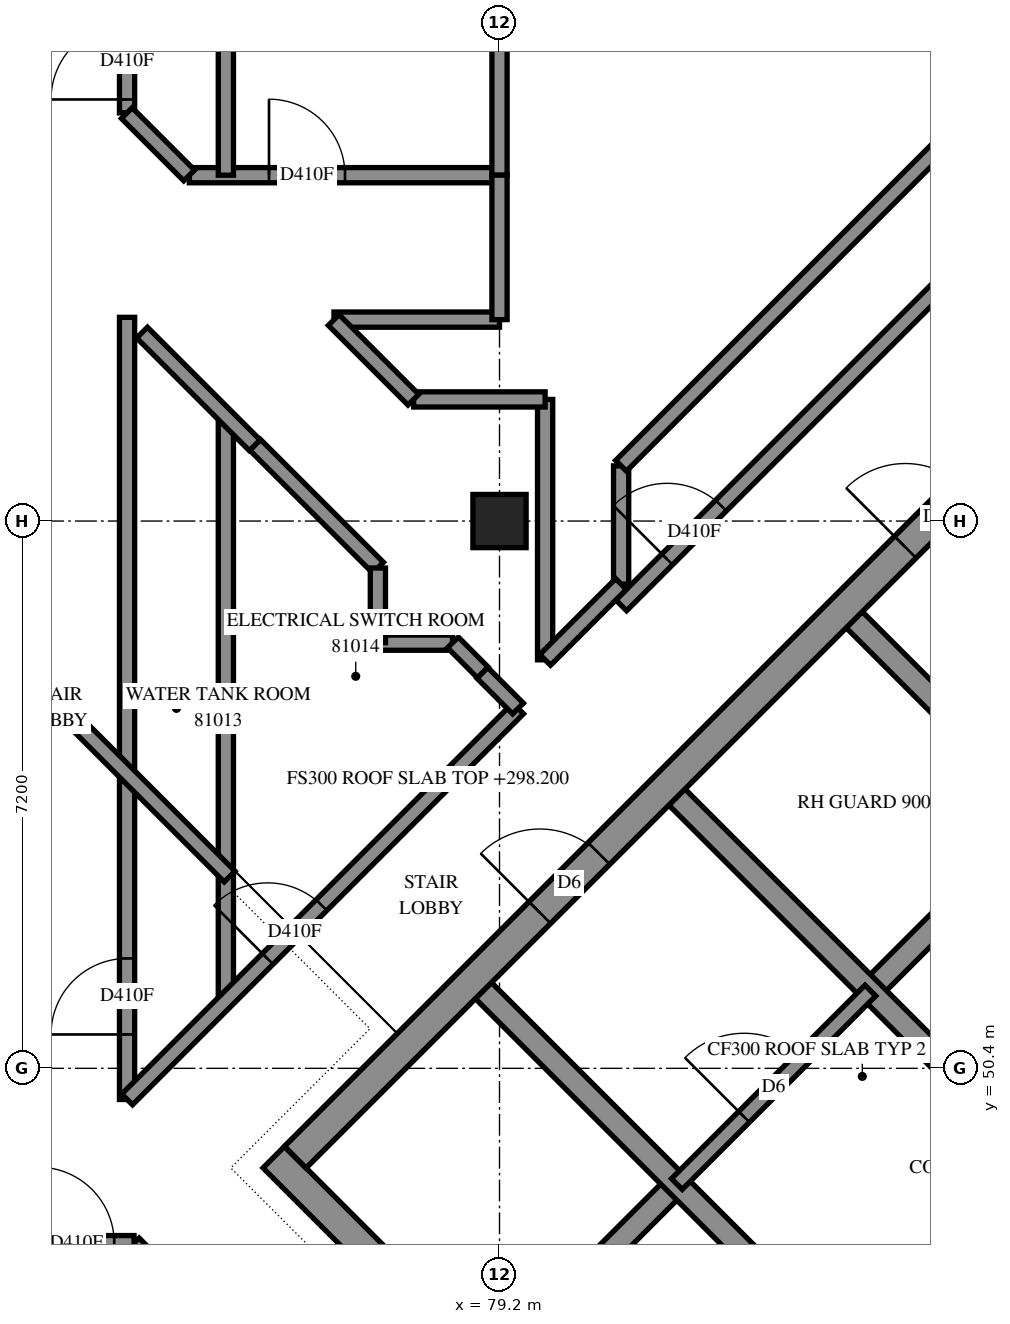
"""IFC4 building model, lengths in metres.
Left out: names, types, materials, properties, quantities, classifications, styles, units other than length and angle.
Written with IfcOpenShell. Run it as: python <this file> out.ifc"""

import sys

from ifc_helpers import new_model, si_unit, direction, frame, frame_2d, origin, origin_2d, place, context, subcontext, project, spatial, polyline, rectangle, outline, extrude, element, fill, save


model = new_model("IFC4")
c1 = context("Model", 3, precision=1e-05, world=origin(), true_north=direction((0.0, 1.0)))
c2 = subcontext(c1, "Body", "Model", "MODEL_VIEW")
j1 = project(units=[si_unit("LENGTHUNIT", "METRE"), si_unit("PLANEANGLEUNIT", "RADIAN")], contexts=[c1])
p1 = place(None, origin())
s1 = spatial("IfcSite", under=j1, at=p1, CompositionType="ELEMENT")
p2 = place(p1, origin())
s2 = spatial("IfcBuilding", under=s1, at=p2, CompositionType="ELEMENT")
p3 = place(p2, frame((0.0, 0.0, 298.2)))
s3 = spatial("IfcBuildingStorey", under=s2, at=p3, CompositionType="ELEMENT", Elevation=298.2)
p4 = place(p3, frame((79.2, 57.6, 0.0), z_axis=(0.0, 0.0, 1.0), x_axis=(1.0, 0.0, 0.0)))
e1 = element("IfcColumn", 1, at=p4, inside=s3, PredefinedType="COLUMN", context=c2, shape_type="SweptSolid", body=[
    extrude(rectangle(XDim=0.7, YDim=0.7, at=origin_2d()), origin(), (0.0, 0.0, 1.0), 3.5),
])
p5 = place(p3, frame((76.23, 49.231, -0.3), z_axis=(0.0, 0.0, 1.0), x_axis=(0.7071006083, -0.707112954, 0.0)))
e2 = element("IfcWall", 2, at=p5, inside=s3, PredefinedType="SHEAR", context=c2, shape_type="SweptSolid", body=[
    extrude(outline(polyline([(0.0, 0.0), (8.1, 0.0), (8.1, 3.1), (0.0, 3.1), (0.0, 0.0)])), frame((0.0, 0.2, 0.0), z_axis=(0.0, -1.0, 0.0), x_axis=(1.0, 0.0, 0.0)), (0.0, 0.0, 1.0), 0.4),
])
p6 = place(p3, frame((76.513, 49.231, -0.3), z_axis=(0.0, 0.0, 1.0), x_axis=(0.7071067812, 0.7071067812, 0.0)))
e3 = element("IfcWall", 3, at=p6, inside=s3, PredefinedType="SHEAR", context=c2, shape_type="SweptSolid", body=[
    extrude(outline(polyline([(0.0, 0.0), (14.4, 0.0), (14.4, 3.1), (0.0, 3.1), (0.0, 0.0)])), frame((0.0, 0.2, 0.0), z_axis=(0.0, -1.0, 0.0), x_axis=(1.0, 0.0, 0.0)), (0.0, 0.0, 1.0), 0.4),
])
p7 = place(p6, frame((4.55, 0.0, 0.3)))
e4 = element("IfcOpeningElement", 4, at=p7, cuts=e3, PredefinedType="OPENING", context=c2, shape_type="SweptSolid", body=[
    extrude(rectangle(XDim=1.1, YDim=2.1, at=frame_2d((0.55, 1.05))), frame((0.0, 0.21, 0.0), z_axis=(0.0, -1.0, 0.0), x_axis=(1.0, 0.0, 0.0)), (0.0, 0.0, 1.0), 0.42),
])
p8 = place(p6, frame((11.35, 0.0, 0.3)))
e5 = element("IfcOpeningElement", 5, at=p8, cuts=e3, PredefinedType="OPENING", context=c2, shape_type="SweptSolid", body=[
    extrude(rectangle(XDim=1.1, YDim=2.1, at=frame_2d((0.55, 1.05))), frame((0.0, 0.21, 0.0), z_axis=(0.0, -1.0, 0.0), x_axis=(1.0, 0.0, 0.0)), (0.0, 0.0, 1.0), 0.42),
])
for number, where, z_axis, x_axis in (
    (6, (79.2, 46.544, 0.0), (0.0, 0.0, 1.0), (0.707, 0.707, 0.0)),
    (7, (84.079, 51.423, 0.0), (0.0, 0.0, 1.0), (0.707, 0.707, 0.0)),
):
    element("IfcWall", number, at=place(p3, frame(where, z_axis=z_axis, x_axis=x_axis)), inside=s3, PredefinedType="SOLIDWALL", context=c2, shape_type="SweptSolid", body=[
        extrude(outline(polyline([(0.0, 0.0), (3.3, 0.0), (3.3, 3.5), (0.0, 3.5), (0.0, 0.0)])), frame((0.0, 0.15, 0.0), z_axis=(0.0, -1.0, 0.0), x_axis=(1.0, 0.0, 0.0)), (0.0, 0.0, 1.0), 0.3),
    ])
p9 = place(p3, frame((78.988, 51.423, 0.0), z_axis=(0.0, 0.0, 1.0), x_axis=(0.7071067812, -0.7071067812, 0.0)))
e8 = element("IfcWall", 8, at=p9, inside=s3, PredefinedType="SOLIDWALL", context=c2, shape_type="SweptSolid", body=[
    extrude(outline(polyline([(0.0, 0.0), (14.4, 0.0), (14.4, 3.5), (0.0, 3.5), (0.0, 0.0)])), frame((0.0, 0.15, 0.0), z_axis=(0.0, -1.0, 0.0), x_axis=(1.0, 0.0, 0.0)), (0.0, 0.0, 1.0), 0.3),
])
p10 = place(p3, frame((81.534, 53.969, 0.0), z_axis=(0.0, 0.0, 1.0), x_axis=(0.707103309, -0.7071102534, 0.0)))
e9 = element("IfcWall", 9, at=p10, inside=s3, PredefinedType="SOLIDWALL", context=c2, shape_type="SweptSolid", body=[
    extrude(outline(polyline([(0.0, 0.0), (14.4, 0.0), (14.4, 3.5), (0.0, 3.5), (0.0, 0.0)])), frame((0.0, 0.15, 0.0), z_axis=(0.0, -1.0, 0.0), x_axis=(1.0, 0.0, 0.0)), (0.0, 0.0, 1.0), 0.3),
])
p11 = place(p10, frame((12.05, 0.0, 0.0)))
e10 = element("IfcOpeningElement", 10, at=p11, cuts=e9, PredefinedType="OPENING", context=c2, shape_type="SweptSolid", body=[
    extrude(rectangle(XDim=1.1, YDim=2.1, at=frame_2d((0.55, 1.05))), frame((0.0, 0.16, 0.0), z_axis=(0.0, -1.0, 0.0), x_axis=(1.0, 0.0, 0.0)), (0.0, 0.0, 1.0), 0.32),
])
p12 = place(p3, frame((83.867, 56.302, 0.0), z_axis=(0.0, 0.0, 1.0), x_axis=(0.7071137256, -0.7070998367, 0.0)))
e11 = element("IfcWall", 11, at=p12, inside=s3, PredefinedType="SOLIDWALL", context=c2, shape_type="SweptSolid", body=[
    extrude(outline(polyline([(0.0, 0.0), (7.2, 0.0), (7.2, 3.5), (0.0, 3.5), (0.0, 0.0)])), frame((0.0, 0.15, 0.0), z_axis=(0.0, -1.0, 0.0), x_axis=(1.0, 0.0, 0.0)), (0.0, 0.0, 1.0), 0.3),
])
p13 = place(p3, frame((70.585, 48.654, 0.0), z_axis=(0.0, 0.0, 1.0), x_axis=(0.707112816, -0.7071007463, 0.0)))
e12 = element("IfcWall", 12, at=p13, inside=s3, PredefinedType="SOLIDWALL", context=c2, shape_type="SweptSolid", body=[
    extrude(outline(polyline([(0.0, -0.2), (8.256, -0.2), (8.314, 0.2), (0.0, 0.2), (0.0, -0.2)])), origin(), (0.0, 0.0, 1.0), 3.5),
])
p14 = place(p13, frame((1.284, 0.0, 0.7)))
e13 = element("IfcOpeningElement", 13, at=p14, cuts=e12, PredefinedType="OPENING", context=c2, shape_type="SweptSolid", body=[
    extrude(rectangle(XDim=1.8, YDim=2.2, at=frame_2d((0.9, 1.1))), frame((0.0, 0.21, 0.0), z_axis=(0.0, -1.0, 0.0), x_axis=(1.0, 0.0, 0.0)), (0.0, 0.0, 1.0), 0.42),
])
p15 = place(p13, frame((4.884, 0.0, 0.7)))
e14 = element("IfcOpeningElement", 14, at=p15, cuts=e12, PredefinedType="OPENING", context=c2, shape_type="SweptSolid", body=[
    extrude(rectangle(XDim=1.8, YDim=2.2, at=frame_2d((0.9, 1.1))), frame((0.0, 0.21, 0.0), z_axis=(0.0, -1.0, 0.0), x_axis=(1.0, 0.0, 0.0)), (0.0, 0.0, 1.0), 0.42),
])
p16 = place(p3, frame((81.534, 48.878, 0.0), z_axis=(0.0, 0.0, 1.0), x_axis=(0.707092892, 0.7071206701, 0.0)))
e15 = element("IfcWall", 15, at=p16, inside=s3, PredefinedType="PARTITIONING", context=c2, shape_type="SweptSolid", body=[
    extrude(outline(polyline([(0.0, 0.0), (3.6, 0.0), (3.6, 3.5), (0.0, 3.5), (0.0, 0.0)])), frame((0.0, 0.1, 0.0), z_axis=(0.0, -1.0, 0.0), x_axis=(1.0, 0.0, 0.0)), (0.0, 0.0, 1.0), 0.2),
])
p17 = place(p16, frame((1.25, 0.0, 0.0)))
e16 = element("IfcOpeningElement", 16, at=p17, cuts=e15, PredefinedType="OPENING", context=c2, shape_type="SweptSolid", body=[
    extrude(rectangle(XDim=1.1, YDim=2.1, at=frame_2d((0.55, 1.05))), frame((0.0, 0.11, 0.0), z_axis=(0.0, -1.0, 0.0), x_axis=(1.0, 0.0, 0.0)), (0.0, 0.0, 1.0), 0.22),
])
p18 = place(p3, frame((74.3, 49.99, 0.0), z_axis=(0.0, 0.0, 1.0), x_axis=(0.0, 1.0, 0.0)))
e17 = element("IfcWall", 17, at=p18, inside=s3, PredefinedType="PARTITIONING", context=c2, shape_type="SweptSolid", body=[
    extrude(rectangle(XDim=10.29, YDim=0.2, at=frame_2d((5.145, 0.0))), origin(), (0.0, 0.0, 1.0), 3.5),
])
p19 = place(p18, frame((0.856, 0.0, 0.0)))
e18 = element("IfcOpeningElement", 18, at=p19, cuts=e17, PredefinedType="OPENING", context=c2, shape_type="SweptSolid", body=[
    extrude(rectangle(XDim=1.0, YDim=2.1, at=frame_2d((0.5, 1.05))), frame((0.0, 0.11, 0.0), z_axis=(0.0, -1.0, 0.0), x_axis=(1.0, 0.0, 0.0)), (0.0, 0.0, 1.0), 0.22),
])
p20 = place(p3, frame((74.388, 48.096, 0.0), z_axis=(0.0, 0.0, 1.0), x_axis=(0.7071067812, -0.7071067812, 0.0)))
e19 = element("IfcWall", 19, at=p20, inside=s3, PredefinedType="PARTITIONING", context=c2, shape_type="SweptSolid", body=[
    extrude(rectangle(XDim=8.9, YDim=0.2, at=frame_2d((4.45, 0.0))), origin(), (0.0, 0.0, 1.0), 3.5),
])
p21 = place(p20, frame((2.564, 0.0, 0.0)))
e20 = element("IfcOpeningElement", 20, at=p21, cuts=e19, PredefinedType="OPENING", context=c2, shape_type="SweptSolid", body=[
    extrude(rectangle(XDim=1.0, YDim=2.1, at=frame_2d((0.5, 1.05))), frame((0.0, 0.11, 0.0), z_axis=(0.0, -1.0, 0.0), x_axis=(1.0, 0.0, 0.0)), (0.0, 0.0, 1.0), 0.22),
])
p22 = place(p3, frame((80.801, 56.491, 0.0), z_axis=(0.0, 0.0, 1.0), x_axis=(0.7071067812, 0.7071067812, 0.0)))
e21 = element("IfcWall", 21, at=p22, inside=s3, PredefinedType="PARTITIONING", context=c2, shape_type="SweptSolid", body=[
    extrude(rectangle(XDim=8.533, YDim=0.2, at=frame_2d((4.267, 0.0))), origin(), (0.0, 0.0, 1.0), 3.5),
])
p23 = place(p22, frame((0.856, 0.0, 0.0)))
e22 = element("IfcOpeningElement", 22, at=p23, cuts=e21, PredefinedType="OPENING", context=c2, shape_type="SweptSolid", body=[
    extrude(rectangle(XDim=1.0, YDim=2.1, at=frame_2d((0.5, 1.05))), frame((0.0, 0.11, 0.0), z_axis=(0.0, -1.0, 0.0), x_axis=(1.0, 0.0, 0.0)), (0.0, 0.0, 1.0), 0.22),
])
p24 = place(p3, frame((75.6, 51.288, 0.0), z_axis=(0.0, 0.0, 1.0), x_axis=(0.0, 1.0, 0.0)))
e23 = element("IfcWall", 23, at=p24, inside=s3, PredefinedType="PARTITIONING", context=c2, shape_type="SweptSolid", body=[
    extrude(rectangle(XDim=7.694, YDim=0.2, at=frame_2d((3.847, 0.0))), origin(), (0.0, 0.0, 1.0), 3.5),
])
p25 = place(p3, frame((74.301, 49.991, 0.0), z_axis=(0.0, 0.0, 1.0), x_axis=(0.7071067812, 0.7071067812, 0.0)))
e24 = element("IfcWall", 24, at=p25, inside=s3, PredefinedType="PARTITIONING", context=c2, shape_type="SweptSolid", body=[
    extrude(rectangle(XDim=7.275, YDim=0.2, at=frame_2d((3.637, 0.0))), origin(), (0.0, 0.0, 1.0), 3.5),
])
p26 = place(p25, frame((2.615, 0.0, 0.0)))
e25 = element("IfcOpeningElement", 25, at=p26, cuts=e24, PredefinedType="OPENING", context=c2, shape_type="SweptSolid", body=[
    extrude(rectangle(XDim=1.0, YDim=2.1, at=frame_2d((0.5, 1.05))), frame((0.0, 0.11, 0.0), z_axis=(0.0, -1.0, 0.0), x_axis=(1.0, 0.0, 0.0)), (0.0, 0.0, 1.0), 0.22),
])
p27 = place(p3, frame((74.3, 62.97, 0.0), z_axis=(0.0, 0.0, 1.0), x_axis=(0.0, 1.0, 0.0)))
e26 = element("IfcWall", 26, at=p27, inside=s3, PredefinedType="PARTITIONING", context=c2, shape_type="SweptSolid", body=[
    extrude(rectangle(XDim=4.13, YDim=0.2, at=frame_2d((2.065, 0.0))), origin(), (0.0, 0.0, 1.0), 3.5),
])
p28 = place(p27, frame((0.176, 0.0, 0.0)))
e27 = element("IfcOpeningElement", 27, at=p28, cuts=e26, PredefinedType="OPENING", context=c2, shape_type="SweptSolid", body=[
    extrude(rectangle(XDim=1.0, YDim=2.1, at=frame_2d((0.5, 1.05))), frame((0.0, 0.11, 0.0), z_axis=(0.0, -1.0, 0.0), x_axis=(1.0, 0.0, 0.0)), (0.0, 0.0, 1.0), 0.22),
])
p29 = place(p3, frame((75.12, 62.15, 0.0), z_axis=(0.0, 0.0, 1.0), x_axis=(1.0, 0.0, 0.0)))
e28 = element("IfcWall", 28, at=p29, inside=s3, PredefinedType="PARTITIONING", context=c2, shape_type="SweptSolid", body=[
    extrude(rectangle(XDim=4.08, YDim=0.2, at=frame_2d((2.04, 0.0))), origin(), (0.0, 0.0, 1.0), 3.5),
])
p30 = place(p29, frame((1.048, 0.0, 0.0)))
e29 = element("IfcOpeningElement", 29, at=p30, cuts=e28, PredefinedType="OPENING", context=c2, shape_type="SweptSolid", body=[
    extrude(rectangle(XDim=1.0, YDim=2.1, at=frame_2d((0.5, 1.05))), frame((0.0, 0.11, 0.0), z_axis=(0.0, -1.0, 0.0), x_axis=(1.0, 0.0, 0.0)), (0.0, 0.0, 1.0), 0.22),
])
p31 = place(p3, frame((79.8, 55.774, 0.0), z_axis=(0.0, 0.0, 1.0), x_axis=(0.0, 1.0, 0.0)))
e30 = element("IfcWall", 30, at=p31, inside=s3, PredefinedType="PARTITIONING", context=c2, shape_type="SweptSolid", body=[
    extrude(rectangle(XDim=3.426, YDim=0.2, at=frame_2d((1.713, 0.0))), origin(), (0.0, 0.0, 1.0), 3.5),
])
p32 = place(p3, frame((79.2, 62.15, 0.0), z_axis=(0.0, 0.0, 1.0), x_axis=(0.0, 1.0, 0.0)))
e31 = element("IfcWall", 31, at=p32, inside=s3, PredefinedType="PARTITIONING", context=c2, shape_type="SweptSolid", body=[
    extrude(rectangle(XDim=2.3, YDim=0.2, at=frame_2d((1.15, 0.0))), origin(), (0.0, 0.0, 1.0), 3.5),
])
p33 = place(p3, frame((75.985, 58.603, 0.0), z_axis=(0.0, 0.0, 1.0), x_axis=(0.7075439414, -0.7066693506, 0.0)))
e32 = element("IfcWall", 32, at=p33, inside=s3, PredefinedType="PARTITIONING", context=c2, shape_type="SweptSolid", body=[
    extrude(rectangle(XDim=2.287, YDim=0.2, at=frame_2d((1.143, 0.0))), origin(), (0.0, 0.0, 1.0), 3.5),
])
p34 = place(p3, frame((77.022, 60.25, 0.0), z_axis=(0.0, 0.0, 1.0), x_axis=(1.0, 0.0, 0.0)))
e33 = element("IfcWall", 33, at=p34, inside=s3, PredefinedType="PARTITIONING", context=c2, shape_type="SweptSolid", body=[
    extrude(rectangle(XDim=2.178, YDim=0.2, at=frame_2d((1.089, 0.0))), origin(), (0.0, 0.0, 1.0), 3.5),
])
p35 = place(p3, frame((74.497, 60.079, 0.0), z_axis=(0.0, 0.0, 1.0), x_axis=(0.7071067812, -0.7071067812, 0.0)))
e34 = element("IfcWall", 34, at=p35, inside=s3, PredefinedType="PARTITIONING", context=c2, shape_type="SweptSolid", body=[
    extrude(rectangle(XDim=2.096, YDim=0.2, at=frame_2d((1.048, 0.0))), origin(), (0.0, 0.0, 1.0), 3.5),
])
p36 = place(p3, frame((79.2, 60.25, 0.0), z_axis=(0.0, 0.0, 1.0), x_axis=(0.0, 1.0, 0.0)))
e35 = element("IfcWall", 35, at=p36, inside=s3, PredefinedType="PARTITIONING", context=c2, shape_type="SweptSolid", body=[
    extrude(rectangle(XDim=1.9, YDim=0.2, at=frame_2d((0.95, 0.0))), origin(), (0.0, 0.0, 1.0), 3.5),
])
p37 = place(p3, frame((78.07, 59.2, 0.0), z_axis=(0.0, 0.0, 1.0), x_axis=(1.0, 0.0, 0.0)))
e36 = element("IfcWall", 36, at=p37, inside=s3, PredefinedType="PARTITIONING", context=c2, shape_type="SweptSolid", body=[
    extrude(rectangle(XDim=1.73, YDim=0.2, at=frame_2d((0.865, 0.0))), origin(), (0.0, 0.0, 1.0), 3.5),
])
p38 = place(p3, frame((80.8, 56.77, 0.0), z_axis=(0.0, 0.0, 1.0), x_axis=(0.0, 1.0, 0.0)))
e37 = element("IfcWall", 37, at=p38, inside=s3, PredefinedType="PARTITIONING", context=c2, shape_type="SweptSolid", body=[
    extrude(rectangle(XDim=1.556, YDim=0.2, at=frame_2d((0.778, 0.0))), origin(), (0.0, 0.0, 1.0), 3.5),
])
p39 = place(p3, frame((77.019, 60.245, 0.0), z_axis=(0.0, 0.0, 1.0), x_axis=(0.7071067812, -0.7071067812, 0.0)))
e38 = element("IfcWall", 38, at=p39, inside=s3, PredefinedType="PARTITIONING", context=c2, shape_type="SweptSolid", body=[
    extrude(rectangle(XDim=1.482, YDim=0.2, at=frame_2d((0.741, 0.0))), origin(), (0.0, 0.0, 1.0), 3.5),
])
p40 = place(p3, frame((79.801, 55.773, 0.0), z_axis=(0.0, 0.0, 1.0), x_axis=(0.7071067812, 0.7071067812, 0.0)))
e39 = element("IfcWall", 39, at=p40, inside=s3, PredefinedType="PARTITIONING", context=c2, shape_type="SweptSolid", body=[
    extrude(rectangle(XDim=1.411, YDim=0.2, at=frame_2d((0.706, 0.0))), origin(), (0.0, 0.0, 1.0), 3.5),
])
p41 = place(p3, frame((74.297, 62.967, 0.0), z_axis=(0.0, 0.0, 1.0), x_axis=(0.7071067812, -0.7071067812, 0.0)))
e40 = element("IfcWall", 40, at=p41, inside=s3, PredefinedType="PARTITIONING", context=c2, shape_type="SweptSolid", body=[
    extrude(rectangle(XDim=1.16, YDim=0.2, at=frame_2d((0.58, 0.0))), origin(), (0.0, 0.0, 1.0), 3.5),
])
for number, where, z_axis, x_axis in (
    (41, (77.6, 56.0, 0.0), (0.0, 0.0, 1.0), (1.0, 0.0, 0.0)),
    (42, (77.6, 56.0, 0.0), (0.0, 0.0, 1.0), (0.0, 1.0, 0.0)),
):
    element("IfcWall", number, at=place(p3, frame(where, z_axis=z_axis, x_axis=x_axis)), inside=s3, PredefinedType="PARTITIONING", context=c2, shape_type="SweptSolid", body=[
        extrude(rectangle(XDim=0.982, YDim=0.2, at=frame_2d((0.491, 0.0))), origin(), (0.0, 0.0, 1.0), 3.5),
    ])
p42 = place(p3, frame((78.973, 55.603, 0.0), z_axis=(0.0, 0.0, 1.0), x_axis=(0.7071067812, -0.7071067812, 0.0)))
e43 = element("IfcWall", 43, at=p42, inside=s3, PredefinedType="PARTITIONING", context=c2, shape_type="SweptSolid", body=[
    extrude(rectangle(XDim=0.665, YDim=0.2, at=frame_2d((0.332, 0.0))), origin(), (0.0, 0.0, 1.0), 3.5),
])
p43 = place(p3, frame((78.587, 56.003, 0.0), z_axis=(0.0, 0.0, 1.0), x_axis=(0.705305244, -0.7089037401, 0.0)))
e44 = element("IfcWall", 44, at=p43, inside=s3, PredefinedType="PARTITIONING", context=c2, shape_type="SweptSolid", body=[
    extrude(rectangle(XDim=0.556, YDim=0.2, at=frame_2d((0.278, 0.0))), origin(), (0.0, 0.0, 1.0), 3.5),
])
p44 = place(p3, frame((75.65, 52.923, 0.0), z_axis=(0.0, 0.0, 1.0), x_axis=(-0.7071067812, 0.7071067812, 0.0)))
e45 = element("IfcWall", 45, at=p44, inside=s3, PredefinedType="PARAPET", context=c2, shape_type="SweptSolid", body=[
    extrude(outline(polyline([(0.0, -0.1), (3.294, -0.1), (3.294, 0.1), (0.0, 0.1), (0.0, -0.1)])), origin(), (0.0, 0.0, 1.0), 0.25),
])
p45 = place(p3, frame((75.6, 62.15, 0.0), z_axis=(0.0, 0.0, 1.0), x_axis=(0.0, 1.0, 0.0)))
e46 = element("IfcWall", 46, at=p45, inside=s3, PredefinedType="PARTITIONING", context=c2, shape_type="SweptSolid", body=[
    extrude(outline(polyline([(0.0, -0.1), (10.65, -0.1), (10.65, 0.1), (0.0, 0.1), (0.0, -0.1)])), origin(), (0.0, 0.0, 1.0), 3.5),
])
p46 = place(p3, frame((80.799, 58.327, 0.0), z_axis=(0.0, 0.0, 1.0), x_axis=(0.7071067812, 0.7071067812, 0.0)))
e47 = element("IfcWall", 47, at=p46, inside=s3, PredefinedType="PARTITIONING", context=c2, shape_type="SweptSolid", body=[
    extrude(outline(polyline([(0.0, -0.1), (9.338, -0.1), (9.338, 0.1), (0.0, 0.1), (0.0, -0.1)])), origin(), (0.0, 0.0, 1.0), 3.5),
])
p47 = place(p3, frame((71.422, 48.1, 0.0), z_axis=(0.0, 0.0, 1.0), x_axis=(1.0, 0.0, 0.0)))
e48 = element("IfcWall", 48, at=p47, inside=s3, PredefinedType="PARTITIONING", context=c2, shape_type="SweptSolid", body=[
    extrude(outline(polyline([(0.0, -0.1), (2.97, -0.1), (2.97, 0.1), (0.0, 0.1), (0.0, -0.1)])), origin(), (0.0, 0.0, 1.0), 3.5),
])
p48 = place(p47, frame((1.71, 0.0, 0.0)))
e49 = element("IfcOpeningElement", 49, at=p48, cuts=e48, PredefinedType="OPENING", context=c2, shape_type="SweptSolid", body=[
    extrude(rectangle(XDim=1.0, YDim=2.1, at=frame_2d((0.5, 1.05))), frame((0.0, 0.11, 0.0), z_axis=(0.0, -1.0, 0.0), x_axis=(1.0, 0.0, 0.0)), (0.0, 0.0, 1.0), 0.22),
])
p49 = place(p7, origin())
e50 = element("IfcDoor", 50, at=p49, inside=s3, OperationType="DOUBLE_DOOR_SINGLE_SWING", PredefinedType="DOOR", context=c2, shape_type="SweptSolid", body=[
    extrude(rectangle(XDim=1.1, YDim=2.1, at=frame_2d((0.55, 1.05))), frame((0.0, 0.025, 0.0), z_axis=(0.0, -1.0, 0.0), x_axis=(1.0, 0.0, 0.0)), (0.0, 0.0, 1.0), 0.05),
])
fill(e4, e50)
p50 = place(p8, origin())
e51 = element("IfcDoor", 51, at=p50, inside=s3, OperationType="SINGLE_SWING_LEFT", PredefinedType="DOOR", context=c2, shape_type="SweptSolid", body=[
    extrude(rectangle(XDim=1.1, YDim=2.1, at=frame_2d((0.55, 1.05))), frame((0.0, 0.025, 0.0), z_axis=(0.0, -1.0, 0.0), x_axis=(1.0, 0.0, 0.0)), (0.0, 0.0, 1.0), 0.05),
])
fill(e5, e51)
p51 = place(p17, origin())
e52 = element("IfcDoor", 52, at=p51, inside=s3, OperationType="DOUBLE_DOOR_SINGLE_SWING", PredefinedType="DOOR", context=c2, shape_type="SweptSolid", body=[
    extrude(rectangle(XDim=1.1, YDim=2.1, at=frame_2d((0.55, 1.05))), frame((0.0, 0.025, 0.0), z_axis=(0.0, -1.0, 0.0), x_axis=(1.0, 0.0, 0.0)), (0.0, 0.0, 1.0), 0.05),
])
fill(e16, e52)
p52 = place(p48, origin())
e53 = element("IfcDoor", 53, at=p52, inside=s3, OperationType="SINGLE_SWING_LEFT", PredefinedType="DOOR", context=c2, shape_type="SweptSolid", body=[
    extrude(rectangle(XDim=1.0, YDim=2.1, at=frame_2d((0.5, 1.05))), frame((0.0, 0.025, 0.0), z_axis=(0.0, -1.0, 0.0), x_axis=(1.0, 0.0, 0.0)), (0.0, 0.0, 1.0), 0.05),
])
fill(e49, e53)
p53 = place(p19, origin())
e54 = element("IfcDoor", 54, at=p53, inside=s3, OperationType="SINGLE_SWING_LEFT", PredefinedType="DOOR", context=c2, shape_type="SweptSolid", body=[
    extrude(rectangle(XDim=1.0, YDim=2.1, at=frame_2d((0.5, 1.05))), frame((0.0, 0.025, 0.0), z_axis=(0.0, -1.0, 0.0), x_axis=(1.0, 0.0, 0.0)), (0.0, 0.0, 1.0), 0.05),
])
fill(e18, e54)
p54 = place(p26, origin())
e55 = element("IfcDoor", 55, at=p54, inside=s3, OperationType="SINGLE_SWING_LEFT", PredefinedType="DOOR", context=c2, shape_type="SweptSolid", body=[
    extrude(rectangle(XDim=1.0, YDim=2.1, at=frame_2d((0.5, 1.05))), frame((0.0, 0.025, 0.0), z_axis=(0.0, -1.0, 0.0), x_axis=(1.0, 0.0, 0.0)), (0.0, 0.0, 1.0), 0.05),
])
fill(e25, e55)
p55 = place(p28, origin())
e56 = element("IfcDoor", 56, at=p55, inside=s3, OperationType="SINGLE_SWING_RIGHT", PredefinedType="DOOR", context=c2, shape_type="SweptSolid", body=[
    extrude(rectangle(XDim=1.0, YDim=2.1, at=frame_2d((0.5, 1.05))), frame((0.0, 0.025, 0.0), z_axis=(0.0, -1.0, 0.0), x_axis=(1.0, 0.0, 0.0)), (0.0, 0.0, 1.0), 0.05),
])
fill(e27, e56)
p56 = place(p30, origin())
e57 = element("IfcDoor", 57, at=p56, inside=s3, OperationType="SINGLE_SWING_LEFT", PredefinedType="DOOR", context=c2, shape_type="SweptSolid", body=[
    extrude(rectangle(XDim=1.0, YDim=2.1, at=frame_2d((0.5, 1.05))), frame((0.0, 0.025, 0.0), z_axis=(0.0, -1.0, 0.0), x_axis=(1.0, 0.0, 0.0)), (0.0, 0.0, 1.0), 0.05),
])
fill(e29, e57)
p57 = place(p23, origin())
e58 = element("IfcDoor", 58, at=p57, inside=s3, OperationType="SINGLE_SWING_RIGHT", PredefinedType="DOOR", context=c2, shape_type="SweptSolid", body=[
    extrude(rectangle(XDim=1.0, YDim=2.1, at=frame_2d((0.5, 1.05))), frame((0.0, 0.025, 0.0), z_axis=(0.0, -1.0, 0.0), x_axis=(1.0, 0.0, 0.0)), (0.0, 0.0, 1.0), 0.05),
])
fill(e22, e58)
save(model, sys.argv[1])
